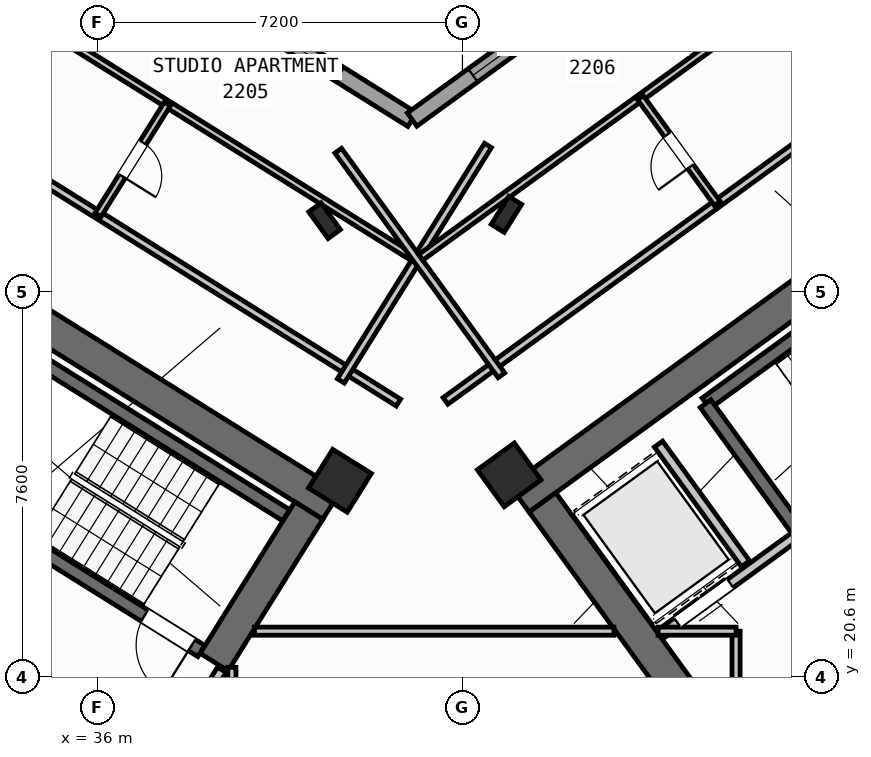
"""IFC4 building model, lengths in metres.
Left out: names, types, materials, properties, quantities, classifications, styles, units other than length and angle.
Written with IfcOpenShell. Run it as: python <this file> out.ifc"""

import sys

from ifc_helpers import new_model, si_unit, direction, frame, frame_2d, origin, origin_2d, place, context, subcontext, project, spatial, rectangle, hollow_rectangle, i_section, extrude, source, transform, mapped, element, fill, save


model = new_model("IFC4")
c1 = context("Model", 3, precision=1e-05, world=origin(), true_north=direction((0.0, 1.0)))
c2 = subcontext(c1, "Body", "Model", "MODEL_VIEW")
j1 = project(units=[si_unit("LENGTHUNIT", "METRE"), si_unit("PLANEANGLEUNIT", "RADIAN")], contexts=[c1])
p1 = place(None, origin())
s1 = spatial("IfcSite", under=j1, at=p1, CompositionType="ELEMENT")
p2 = place(p1, origin())
s2 = spatial("IfcBuilding", under=s1, at=p2, CompositionType="ELEMENT")
p3 = place(p2, frame((0.0, 0.0, 90.0)))
s3 = spatial("IfcBuildingStorey", under=s2, at=p3, CompositionType="ELEMENT", Elevation=90.0)
p4 = place(p3, frame((40.615, 23.983, 0.0), z_axis=(0.0, 0.0, 1.0), x_axis=(-0.848045953968, 0.529922692436, 0.0)))
e1 = element("IfcWall", 1, at=p4, inside=s3, PredefinedType="SHEAR", context=c2, shape_type="SweptSolid", body=[
    extrude(rectangle(XDim=13.24, YDim=0.65, at=frame_2d((6.62, 0.0))), origin(), (0.0, 0.0, 1.0), 3.35),
])
p5 = place(p3, frame((40.168, 23.88, 0.0), z_axis=(0.0, 0.0, 1.0), x_axis=(-0.529893103397, -0.8480644427, 0.0)))
e2 = element("IfcWall", 2, at=p5, inside=s3, PredefinedType="SHEAR", context=c2, shape_type="SweptSolid", body=[
    extrude(rectangle(XDim=3.525, YDim=0.65, at=frame_2d((1.763, 0.0))), origin(), (0.0, 0.0, 1.0), 3.35),
])
p6 = place(p3, frame((44.325, 24.113, 0.0), z_axis=(0.0, 0.0, 1.0), x_axis=(0.809012664862, 0.58779121131, 0.0)))
e3 = element("IfcWall", 3, at=p6, inside=s3, PredefinedType="SHEAR", context=c2, shape_type="SweptSolid", body=[
    extrude(rectangle(XDim=12.44, YDim=0.65, at=frame_2d((6.22, 0.0))), origin(), (0.0, 0.0, 1.0), 3.35),
])
p7 = place(p3, frame((48.526, 18.884, 0.0), z_axis=(0.0, 0.0, 1.0), x_axis=(-0.58777996584, 0.809020835181, 0.0)))
e4 = element("IfcWall", 4, at=p7, inside=s3, PredefinedType="SHEAR", context=c2, shape_type="SweptSolid", body=[
    extrude(rectangle(XDim=6.375, YDim=0.65, at=frame_2d((3.188, 0.0))), origin(), (0.0, 0.0, 1.0), 3.35),
])
m1 = source(origin(), c2, "Body", "SweptSolid", [
    extrude(i_section(OverallWidth=0.3, OverallDepth=0.65, WebThickness=0.016, FlangeThickness=0.031, at=origin_2d()), origin(), (0.0, 0.0, 1.0), 3.6),
])
p8 = place(p3, frame((44.068, 29.726, 0.0), z_axis=(0.0, 0.0, 1.0), x_axis=(-0.848048096156, 0.529919264233, 0.0)))
e5 = element("IfcColumn", 5, at=p8, inside=s3, PredefinedType="COLUMN", context=c2, shape_type="MappedRepresentation", body=[
    mapped(m1, transform((0.0, 0.0, 0.0), scale=1.0)),
])
m2 = source(origin(), c2, "Body", "SweptSolid", [
    extrude(hollow_rectangle(XDim=0.9, YDim=0.9, WallThickness=0.036, at=origin_2d()), origin(), (0.0, 0.0, 1.0), 3.6),
])
for number, where, z_axis, x_axis in (
    (6, (40.783, 24.469, 0.0), (0.0, 0.0, 1.0), (-0.848, 0.53, 0.0)),
    (7, (44.124, 24.585, 0.0), (0.0, 0.0, 1.0), (0.809, 0.588, 0.0)),
):
    element("IfcColumn", number, at=place(p3, frame(where, z_axis=z_axis, x_axis=x_axis)), inside=s3, PredefinedType="COLUMN", context=c2, shape_type="MappedRepresentation", body=[
        mapped(m2, transform((0.0, 0.0, 0.0), scale=1.0)),
    ])
p9 = place(p3, frame((40.479, 29.601, 0.0), z_axis=(0.0, 0.0, 1.0), x_axis=(0.809016994375, 0.587785252292, 0.0)))
e8 = element("IfcColumn", 8, at=p9, inside=s3, PredefinedType="COLUMN", context=c2, shape_type="MappedRepresentation", body=[
    mapped(m1, transform((0.0, 0.0, 0.0), scale=1.0)),
])
p10 = place(p3, frame((17.424, 47.083, 0.0), z_axis=(0.0, 0.0, 1.0), x_axis=(0.848049927979, -0.529916332693, 0.0)))
e9 = element("IfcWall", 9, at=p10, inside=s3, PredefinedType="STANDARD", context=c2, shape_type="SweptSolid", body=[
    extrude(rectangle(XDim=29.223, YDim=0.32, at=frame_2d((14.612, 0.0))), origin(), (0.0, 0.0, 1.0), 3.35),
])
p11 = place(p10, frame((15.02, 0.0, 0.0)))
e10 = element("IfcOpeningElement", 10, at=p11, cuts=e9, PredefinedType="OPENING", context=c2, shape_type="SweptSolid", body=[
    extrude(rectangle(XDim=1.05, YDim=2.15, at=frame_2d((0.525, 1.075))), frame((0.0, 0.17, 0.0), z_axis=(0.0, -1.0, 0.0), x_axis=(1.0, 0.0, 0.0)), (0.0, 0.0, 1.0), 0.34),
])
p12 = place(p10, frame((20.869, 0.0, 0.8)))
e11 = element("IfcOpeningElement", 11, at=p12, cuts=e9, PredefinedType="OPENING", context=c2, shape_type="SweptSolid", body=[
    extrude(rectangle(XDim=2.1, YDim=1.55, at=frame_2d((1.05, 0.775))), frame((0.0, 0.17, 0.0), z_axis=(0.0, -1.0, 0.0), x_axis=(1.0, 0.0, 0.0)), (0.0, 0.0, 1.0), 0.34),
])
p13 = place(p10, frame((25.438, 0.0, 0.8)))
e12 = element("IfcOpeningElement", 12, at=p13, cuts=e9, PredefinedType="OPENING", context=c2, shape_type="SweptSolid", body=[
    extrude(rectangle(XDim=2.1, YDim=1.55, at=frame_2d((1.05, 0.775))), frame((0.0, 0.17, 0.0), z_axis=(0.0, -1.0, 0.0), x_axis=(1.0, 0.0, 0.0)), (0.0, 0.0, 1.0), 0.34),
])
p14 = place(p10, frame((10.481, 0.0, 1.0)))
e13 = element("IfcOpeningElement", 13, at=p14, cuts=e9, PredefinedType="OPENING", context=c2, shape_type="SweptSolid", body=[
    extrude(rectangle(XDim=0.9, YDim=1.25, at=frame_2d((0.45, 0.625))), frame((0.0, 0.17, 0.0), z_axis=(0.0, -1.0, 0.0), x_axis=(1.0, 0.0, 0.0)), (0.0, 0.0, 1.0), 0.34),
])
p15 = place(p10, frame((6.674, 0.0, 1.0)))
e14 = element("IfcOpeningElement", 14, at=p15, cuts=e9, PredefinedType="OPENING", context=c2, shape_type="SweptSolid", body=[
    extrude(rectangle(XDim=0.9, YDim=1.25, at=frame_2d((0.45, 0.625))), frame((0.0, 0.17, 0.0), z_axis=(0.0, -1.0, 0.0), x_axis=(1.0, 0.0, 0.0)), (0.0, 0.0, 1.0), 0.34),
])
p16 = place(p10, frame((3.694, 0.0, 1.0)))
e15 = element("IfcOpeningElement", 15, at=p16, cuts=e9, PredefinedType="OPENING", context=c2, shape_type="SweptSolid", body=[
    extrude(rectangle(XDim=0.9, YDim=1.25, at=frame_2d((0.45, 0.625))), frame((0.0, 0.17, 0.0), z_axis=(0.0, -1.0, 0.0), x_axis=(1.0, 0.0, 0.0)), (0.0, 0.0, 1.0), 0.34),
])
p17 = place(p3, frame((42.207, 31.597, 0.0), z_axis=(0.0, 0.0, 1.0), x_axis=(0.809020333377, 0.587780656523, 0.0)))
e16 = element("IfcWall", 16, at=p17, inside=s3, PredefinedType="STANDARD", context=c2, shape_type="SweptSolid", body=[
    extrude(rectangle(XDim=15.223, YDim=0.32, at=frame_2d((7.611, 0.0))), origin(), (0.0, 0.0, 1.0), 3.35),
])
p18 = place(p17, frame((12.831, 0.0, 0.0)))
e17 = element("IfcOpeningElement", 17, at=p18, cuts=e16, PredefinedType="OPENING", context=c2, shape_type="SweptSolid", body=[
    extrude(rectangle(XDim=1.05, YDim=2.15, at=frame_2d((0.525, 1.075))), frame((0.0, 0.17, 0.0), z_axis=(0.0, -1.0, 0.0), x_axis=(1.0, 0.0, 0.0)), (0.0, 0.0, 1.0), 0.34),
])
p19 = place(p17, frame((1.484, 0.0, 0.8)))
e18 = element("IfcOpeningElement", 18, at=p19, cuts=e16, PredefinedType="OPENING", context=c2, shape_type="SweptSolid", body=[
    extrude(rectangle(XDim=2.1, YDim=1.55, at=frame_2d((1.05, 0.775))), frame((0.0, 0.17, 0.0), z_axis=(0.0, -1.0, 0.0), x_axis=(1.0, 0.0, 0.0)), (0.0, 0.0, 1.0), 0.34),
])
p20 = place(p17, frame((5.652, 0.0, 0.8)))
e19 = element("IfcOpeningElement", 19, at=p20, cuts=e16, PredefinedType="OPENING", context=c2, shape_type="SweptSolid", body=[
    extrude(rectangle(XDim=2.1, YDim=1.55, at=frame_2d((1.05, 0.775))), frame((0.0, 0.17, 0.0), z_axis=(0.0, -1.0, 0.0), x_axis=(1.0, 0.0, 0.0)), (0.0, 0.0, 1.0), 0.34),
])
p21 = place(p3, frame((39.721, 23.788, 0.0), z_axis=(0.0, 0.0, 1.0), x_axis=(-0.848054434086, 0.529909121291, 0.0)))
e20 = element("IfcWall", 20, at=p21, inside=s3, PredefinedType="SHEAR", context=c2, shape_type="SweptSolid", body=[
    extrude(rectangle(XDim=7.33, YDim=0.26, at=frame_2d((3.665, 0.0))), origin(), (0.0, 0.0, 1.0), 3.35),
])
p22 = place(p3, frame((38.046, 21.108, 0.0), z_axis=(0.0, 0.0, 1.0), x_axis=(-0.848054434086, 0.529909121291, 0.0)))
e21 = element("IfcWall", 21, at=p22, inside=s3, PredefinedType="SHEAR", context=c2, shape_type="SweptSolid", body=[
    extrude(rectangle(XDim=7.33, YDim=0.26, at=frame_2d((3.665, 0.0))), origin(), (0.0, 0.0, 1.0), 3.35),
])
p23 = place(p22, frame((0.22, 0.0, 0.0)))
e22 = element("IfcOpeningElement", 22, at=p23, cuts=e21, PredefinedType="OPENING", context=c2, shape_type="SweptSolid", body=[
    extrude(rectangle(XDim=1.1, YDim=2.1, at=frame_2d((0.55, 1.05))), frame((0.0, 0.14, 0.0), z_axis=(0.0, -1.0, 0.0), x_axis=(1.0, 0.0, 0.0)), (0.0, 0.0, 1.0), 0.28),
])
p24 = place(p3, frame((36.374, 18.474, 0.0), z_axis=(0.0, 0.0, 1.0), x_axis=(-0.848051071577, 0.529914502535, 0.0)))
e23 = element("IfcWall", 23, at=p24, inside=s3, PredefinedType="STANDARD", context=c2, shape_type="SweptSolid", body=[
    extrude(rectangle(XDim=5.718, YDim=0.2, at=frame_2d((2.859, 0.0))), origin(), (0.0, 0.0, 1.0), 3.34),
])
p25 = place(p24, frame((2.498, 0.0, 0.0)))
e24 = element("IfcOpeningElement", 24, at=p25, cuts=e23, PredefinedType="OPENING", context=c2, shape_type="SweptSolid", body=[
    extrude(rectangle(XDim=1.15, YDim=2.1, at=frame_2d((0.575, 1.05))), frame((0.0, 0.11, 0.0), z_axis=(0.0, -1.0, 0.0), x_axis=(1.0, 0.0, 0.0)), (0.0, 0.0, 1.0), 0.22),
])
p26 = place(p3, frame((48.006, 25.996, 0.0), z_axis=(0.0, 0.0, 1.0), x_axis=(0.80901903764, 0.587782439969, 0.0)))
e25 = element("IfcWall", 25, at=p26, inside=s3, PredefinedType="SHEAR", context=c2, shape_type="SweptSolid", body=[
    extrude(rectangle(XDim=7.46, YDim=0.26, at=frame_2d((3.73, 0.0))), origin(), (0.0, 0.0, 1.0), 3.35),
])
p27 = place(p3, frame((49.855, 23.434, 0.0), z_axis=(0.0, 0.0, 1.0), x_axis=(-0.58776738483, 0.809029975545, 0.0)))
e26 = element("IfcWall", 26, at=p27, inside=s3, PredefinedType="SHEAR", context=c2, shape_type="SweptSolid", body=[
    extrude(rectangle(XDim=3.16, YDim=0.26, at=frame_2d((1.58, 0.0))), origin(), (0.0, 0.0, 1.0), 3.35),
])
p28 = place(p3, frame((47.106, 21.437, 0.0), z_axis=(0.0, 0.0, 1.0), x_axis=(0.809012514015, 0.58779141893, 0.0)))
e27 = element("IfcWall", 27, at=p28, inside=s3, PredefinedType="STANDARD", context=c2, shape_type="SweptSolid", body=[
    extrude(rectangle(XDim=3.398, YDim=0.2, at=frame_2d((1.699, 0.0))), origin(), (0.0, 0.0, 1.0), 3.34),
])
p29 = place(p28, frame((0.408, 0.0, 0.0)))
e28 = element("IfcOpeningElement", 28, at=p29, cuts=e27, PredefinedType="OPENING", context=c2, shape_type="SweptSolid", body=[
    extrude(rectangle(XDim=1.3, YDim=2.2, at=frame_2d((0.65, 1.1))), frame((0.0, 0.11, 0.0), z_axis=(0.0, -1.0, 0.0), x_axis=(1.0, 0.0, 0.0)), (0.0, 0.0, 1.0), 0.22),
])
p30 = place(p3, frame((48.799, 19.107, 0.0), z_axis=(0.0, 0.0, 1.0), x_axis=(0.809012959416, 0.587790805897, 0.0)))
e29 = element("IfcWall", 29, at=p30, inside=s3, PredefinedType="STANDARD", context=c2, shape_type="SweptSolid", body=[
    extrude(rectangle(XDim=5.718, YDim=0.2, at=frame_2d((2.859, 0.0))), origin(), (0.0, 0.0, 1.0), 3.34),
])
p31 = place(p30, frame((2.498, 0.0, 0.0)))
e30 = element("IfcOpeningElement", 30, at=p31, cuts=e29, PredefinedType="OPENING", context=c2, shape_type="SweptSolid", body=[
    extrude(rectangle(XDim=1.15, YDim=2.1, at=frame_2d((0.575, 1.05))), frame((0.0, 0.11, 0.0), z_axis=(0.0, -1.0, 0.0), x_axis=(1.0, 0.0, 0.0)), (0.0, 0.0, 1.0), 0.22),
])
p32 = place(p3, frame((48.786, 22.83, 0.0), z_axis=(0.0, 0.0, 1.0), x_axis=(-0.587783856777, 0.809018008275, 0.0)))
e31 = element("IfcWall", 31, at=p32, inside=s3, PredefinedType="STANDARD", context=c2, shape_type="SweptSolid", body=[
    extrude(rectangle(XDim=2.92, YDim=0.2, at=frame_2d((1.46, 0.0))), origin(), (0.0, 0.0, 1.0), 3.34),
])
p33 = place(p3, frame((41.936, 26.012, 0.0), z_axis=(0.0, 0.0, 1.0), x_axis=(-0.848051154596, 0.529914369676, 0.0)))
e32 = element("IfcWall", 32, at=p33, inside=s3, PredefinedType="PARTITIONING", context=c2, shape_type="SweptSolid", body=[
    extrude(rectangle(XDim=15.57, YDim=0.16, at=frame_2d((7.785, 0.0))), origin(), (0.0, 0.0, 1.0), 3.34),
])
p34 = place(p33, frame((10.83, 0.0, 0.0)))
e33 = element("IfcOpeningElement", 33, at=p34, cuts=e32, PredefinedType="OPENING", context=c2, shape_type="SweptSolid", body=[
    extrude(rectangle(XDim=1.0, YDim=2.1, at=frame_2d((0.5, 1.05))), frame((0.0, 0.09, 0.0), z_axis=(0.0, -1.0, 0.0), x_axis=(1.0, 0.0, 0.0)), (0.0, 0.0, 1.0), 0.18),
])
p35 = place(p3, frame((43.704, 31.086, 0.0), z_axis=(0.0, 0.0, 1.0), x_axis=(-0.529906828443, -0.848055866774, 0.0)))
e34 = element("IfcWall", 34, at=p35, inside=s3, PredefinedType="PARTITIONING", context=c2, shape_type="SweptSolid", body=[
    extrude(rectangle(XDim=5.48, YDim=0.16, at=frame_2d((2.74, 0.0))), origin(), (0.0, 0.0, 1.0), 3.34),
])
p36 = place(p3, frame((42.226, 28.873, 0.0), z_axis=(0.0, 0.0, 1.0), x_axis=(-0.848049134363, 0.529917602752, 0.0)))
e35 = element("IfcWall", 35, at=p36, inside=s3, PredefinedType="PLUMBINGWALL", context=c2, shape_type="SweptSolid", body=[
    extrude(rectangle(XDim=14.3, YDim=0.14, at=frame_2d((7.15, 0.0))), origin(), (0.0, 0.0, 1.0), 3.34),
])
p37 = place(p36, frame((9.57, 0.0, 0.0)))
e36 = element("IfcOpeningElement", 36, at=p37, cuts=e35, PredefinedType="OPENING", context=c2, shape_type="SweptSolid", body=[
    extrude(rectangle(XDim=0.92, YDim=2.08, at=frame_2d((0.46, 1.04))), frame((0.0, 0.08, 0.0), z_axis=(0.0, -1.0, 0.0), x_axis=(1.0, 0.0, 0.0)), (0.0, 0.0, 1.0), 0.16),
])
p38 = place(p3, frame((37.375, 31.904, 0.0), z_axis=(0.0, 0.0, 1.0), x_axis=(-0.529913878929, -0.848051461244, 0.0)))
e37 = element("IfcWall", 37, at=p38, inside=s3, PredefinedType="PLUMBINGWALL", context=c2, shape_type="SweptSolid", body=[
    extrude(rectangle(XDim=2.58, YDim=0.14, at=frame_2d((1.29, 0.0))), origin(), (0.0, 0.0, 1.0), 3.34),
])
p39 = place(p38, frame((0.9, 0.0, 0.0)))
e38 = element("IfcOpeningElement", 38, at=p39, cuts=e37, PredefinedType="OPENING", context=c2, shape_type="SweptSolid", body=[
    extrude(rectangle(XDim=0.78, YDim=2.05, at=frame_2d((0.39, 1.025))), frame((0.0, 0.08, 0.0), z_axis=(0.0, -1.0, 0.0), x_axis=(1.0, 0.0, 0.0)), (0.0, 0.0, 1.0), 0.16),
])
p40 = place(p3, frame((38.451, 20.737, 0.0), z_axis=(0.0, 0.0, 1.0), x_axis=(-0.529924799939, -0.848044637038, 0.0)))
e39 = element("IfcWall", 39, at=p40, inside=s3, PredefinedType="STANDARD", context=c2, shape_type="SweptSolid", body=[
    extrude(rectangle(XDim=2.96, YDim=0.2, at=frame_2d((1.48, 0.0))), origin(), (0.0, 0.0, 1.0), 3.34),
])
p41 = place(p40, frame((1.46, 0.0, 0.0)))
e40 = element("IfcOpeningElement", 40, at=p41, cuts=e39, PredefinedType="OPENING", context=c2, shape_type="SweptSolid", body=[
    extrude(rectangle(XDim=0.86, YDim=2.05, at=frame_2d((0.43, 1.025))), frame((0.0, 0.11, 0.0), z_axis=(0.0, -1.0, 0.0), x_axis=(1.0, 0.0, 0.0)), (0.0, 0.0, 1.0), 0.22),
])
p42 = place(p3, frame((38.65, 17.93, 0.0), z_axis=(0.0, 0.0, 1.0), x_axis=(0.0, 1.0, 0.0)))
e41 = element("IfcWall", 41, at=p42, inside=s3, PredefinedType="PARTITIONING", context=c2, shape_type="SweptSolid", body=[
    extrude(rectangle(XDim=2.857, YDim=0.16, at=frame_2d((1.428, 0.0))), origin(), (0.0, 0.0, 1.0), 3.34),
])
p43 = place(p3, frame((48.6, 19.38, 0.0), z_axis=(0.0, 0.0, 1.0), x_axis=(0.0, 1.0, 0.0)))
e42 = element("IfcWall", 42, at=p43, inside=s3, PredefinedType="PARTITIONING", context=c2, shape_type="SweptSolid", body=[
    extrude(rectangle(XDim=2.12, YDim=0.16, at=frame_2d((1.06, 0.0))), origin(), (0.0, 0.0, 1.0), 3.34),
])
p44 = place(p3, frame((39.095, 21.5, 0.0), z_axis=(0.0, 0.0, 1.0), x_axis=(1.0, 0.0, 0.0)))
e43 = element("IfcWall", 43, at=p44, inside=s3, PredefinedType="PARTITIONING", context=c2, shape_type="SweptSolid", body=[
    extrude(rectangle(XDim=7.094, YDim=0.16, at=frame_2d((3.547, 0.0))), origin(), (0.0, 0.0, 1.0), 3.34),
])
p45 = place(p3, frame((47.06, 21.5, 0.0), z_axis=(0.0, 0.0, 1.0), x_axis=(1.0, 0.0, 0.0)))
e44 = element("IfcWall", 44, at=p45, inside=s3, PredefinedType="PARTITIONING", context=c2, shape_type="SweptSolid", body=[
    extrude(rectangle(XDim=1.54, YDim=0.16, at=frame_2d((0.77, 0.0))), origin(), (0.0, 0.0, 1.0), 3.34),
])
p46 = place(p3, frame((42.866, 26.044, 0.0), z_axis=(0.0, 0.0, 1.0), x_axis=(0.809020254154, 0.587780765566, 0.0)))
e45 = element("IfcWall", 45, at=p46, inside=s3, PredefinedType="PARTITIONING", context=c2, shape_type="SweptSolid", body=[
    extrude(rectangle(XDim=14.67, YDim=0.16, at=frame_2d((7.335, 0.0))), origin(), (0.0, 0.0, 1.0), 3.34),
])
p47 = place(p46, frame((10.2, 0.0, 0.0)))
e46 = element("IfcOpeningElement", 46, at=p47, cuts=e45, PredefinedType="OPENING", context=c2, shape_type="SweptSolid", body=[
    extrude(rectangle(XDim=1.0, YDim=2.1, at=frame_2d((0.5, 1.05))), frame((0.0, 0.09, 0.0), z_axis=(0.0, -1.0, 0.0), x_axis=(1.0, 0.0, 0.0)), (0.0, 0.0, 1.0), 0.18),
])
p48 = place(p3, frame((43.969, 26.55, 0.0), z_axis=(0.0, 0.0, 1.0), x_axis=(-0.587776919386, 0.80902304852, 0.0)))
e47 = element("IfcWall", 47, at=p48, inside=s3, PredefinedType="PARTITIONING", context=c2, shape_type="SweptSolid", body=[
    extrude(rectangle(XDim=5.48, YDim=0.16, at=frame_2d((2.74, 0.0))), origin(), (0.0, 0.0, 1.0), 3.34),
])
p49 = place(p3, frame((42.377, 28.878, 0.0), z_axis=(0.0, 0.0, 1.0), x_axis=(0.809020411523, 0.587780548963, 0.0)))
e48 = element("IfcWall", 48, at=p49, inside=s3, PredefinedType="PLUMBINGWALL", context=c2, shape_type="SweptSolid", body=[
    extrude(rectangle(XDim=13.4, YDim=0.14, at=frame_2d((6.7, 0.0))), origin(), (0.0, 0.0, 1.0), 3.34),
])
p50 = place(p49, frame((8.94, 0.0, 0.0)))
e49 = element("IfcOpeningElement", 49, at=p50, cuts=e48, PredefinedType="OPENING", context=c2, shape_type="SweptSolid", body=[
    extrude(rectangle(XDim=0.92, YDim=2.08, at=frame_2d((0.46, 1.04))), frame((0.0, 0.08, 0.0), z_axis=(0.0, -1.0, 0.0), x_axis=(1.0, 0.0, 0.0)), (0.0, 0.0, 1.0), 0.16),
])
p51 = place(p3, frame((48.229, 29.941, 0.0), z_axis=(0.0, 0.0, 1.0), x_axis=(-0.587772116736, 0.809026537752, 0.0)))
e50 = element("IfcWall", 50, at=p51, inside=s3, PredefinedType="PLUMBINGWALL", context=c2, shape_type="SweptSolid", body=[
    extrude(rectangle(XDim=2.58, YDim=0.14, at=frame_2d((1.29, 0.0))), origin(), (0.0, 0.0, 1.0), 3.34),
])
p52 = place(p51, frame((0.9, 0.0, 0.0)))
e51 = element("IfcOpeningElement", 51, at=p52, cuts=e50, PredefinedType="OPENING", context=c2, shape_type="SweptSolid", body=[
    extrude(rectangle(XDim=0.78, YDim=2.05, at=frame_2d((0.39, 1.025))), frame((0.0, 0.08, 0.0), z_axis=(0.0, -1.0, 0.0), x_axis=(1.0, 0.0, 0.0)), (0.0, 0.0, 1.0), 0.16),
])
m3 = source(origin(), c2, "Body", "SweptSolid", [
    extrude(rectangle(XDim=2.1, YDim=1.55, at=frame_2d((1.05, 0.775))), frame((0.0, 0.03, 0.0), z_axis=(0.0, -1.0, 0.0), x_axis=(1.0, 0.0, 0.0)), (0.0, 0.0, 1.0), 0.06),
])
p53 = place(p13, origin())
e52 = element("IfcWindow", 52, at=p53, inside=s3, PartitioningType="SINGLE_PANEL", PredefinedType="WINDOW", context=c2, shape_type="MappedRepresentation", body=[
    mapped(m3, transform((0.0, 0.0, 0.0), scale=1.0)),
])
fill(e12, e52)
p54 = place(p19, origin())
e53 = element("IfcWindow", 53, at=p54, inside=s3, PartitioningType="SINGLE_PANEL", PredefinedType="WINDOW", context=c2, shape_type="MappedRepresentation", body=[
    mapped(m3, transform((0.0, 0.0, 0.0), scale=1.0)),
])
fill(e18, e53)
m4 = source(origin(), c2, "Body", "SweptSolid", [
    extrude(rectangle(XDim=1.1, YDim=2.1, at=frame_2d((0.55, 1.05))), frame((0.0, 0.025, 0.0), z_axis=(0.0, -1.0, 0.0), x_axis=(1.0, 0.0, 0.0)), (0.0, 0.0, 1.0), 0.05),
])
p55 = place(p23, origin())
e54 = element("IfcDoor", 54, at=p55, inside=s3, OperationType="SINGLE_SWING_LEFT", PredefinedType="DOOR", context=c2, shape_type="MappedRepresentation", body=[
    mapped(m4, transform((0.0, 0.0, 0.0), scale=1.0)),
])
fill(e22, e54)
m5 = source(origin(), c2, "Body", "SweptSolid", [
    extrude(rectangle(XDim=1.3, YDim=2.2, at=frame_2d((0.65, 1.1))), frame((0.0, 0.025, 0.0), z_axis=(0.0, -1.0, 0.0), x_axis=(1.0, 0.0, 0.0)), (0.0, 0.0, 1.0), 0.05),
])
p56 = place(p29, origin())
e55 = element("IfcDoor", 55, at=p56, inside=s3, OperationType="DOUBLE_DOOR_SLIDING", PredefinedType="DOOR", context=c2, shape_type="MappedRepresentation", body=[
    mapped(m5, transform((0.0, 0.0, 0.0), scale=1.0)),
])
fill(e28, e55)
m6 = source(origin(), c2, "Body", "SweptSolid", [
    extrude(rectangle(XDim=0.78, YDim=2.05, at=frame_2d((0.39, 1.025))), frame((0.0, 0.025, 0.0), z_axis=(0.0, -1.0, 0.0), x_axis=(1.0, 0.0, 0.0)), (0.0, 0.0, 1.0), 0.05),
])
p57 = place(p39, origin())
e56 = element("IfcDoor", 56, at=p57, inside=s3, OperationType="SINGLE_SWING_RIGHT", PredefinedType="DOOR", context=c2, shape_type="MappedRepresentation", body=[
    mapped(m6, transform((0.0, 0.0, 0.0), scale=1.0)),
])
fill(e38, e56)
p58 = place(p52, origin())
e57 = element("IfcDoor", 57, at=p58, inside=s3, OperationType="SINGLE_SWING_LEFT", PredefinedType="DOOR", context=c2, shape_type="MappedRepresentation", body=[
    mapped(m6, transform((0.0, 0.0, 0.0), scale=1.0)),
])
fill(e51, e57)
save(model, sys.argv[1])
